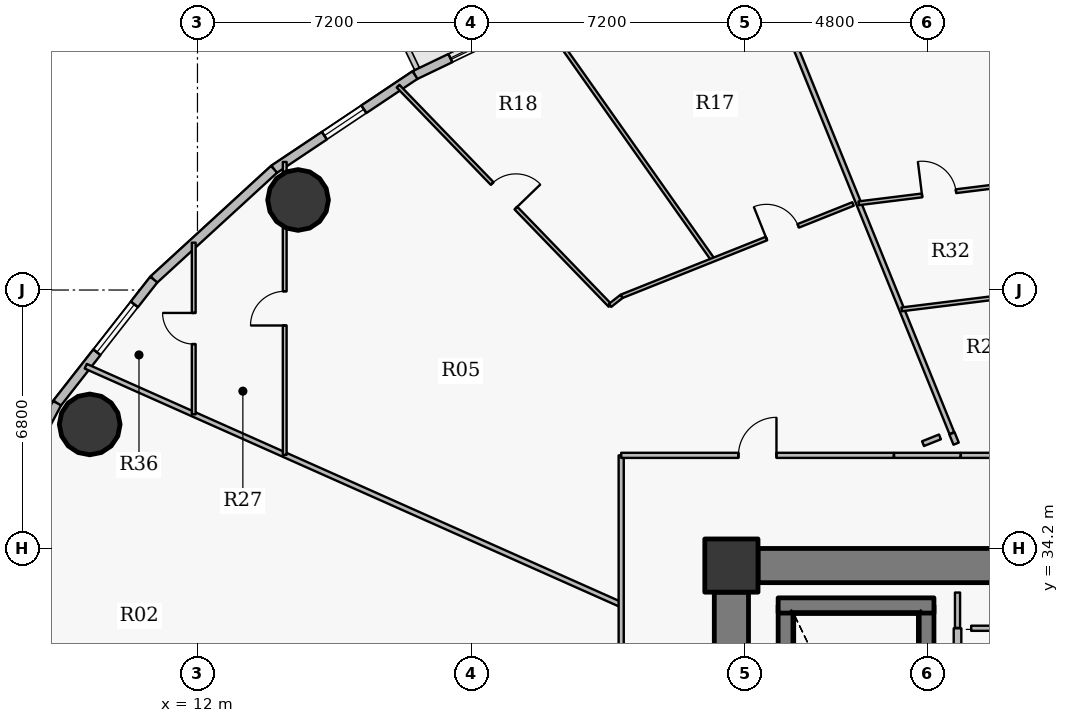
"""IFC4 building model, lengths in metres.
Left out: names, types, materials, properties, quantities, classifications, styles, units other than length and angle.
Written with IfcOpenShell. Run it as: python <this file> out.ifc"""

import sys

from ifc_helpers import new_model, si_unit, direction, frame, frame_2d, origin, origin_2d, place, context, subcontext, project, spatial, rectangle, hollow_circle, extrude, source, transform, mapped, element, fill, save


model = new_model("IFC4")
c1 = context("Model", 3, precision=1e-05, world=origin(), true_north=direction((0.0, 1.0)))
c2 = subcontext(c1, "Body", "Model", "MODEL_VIEW")
j1 = project(units=[si_unit("LENGTHUNIT", "METRE"), si_unit("PLANEANGLEUNIT", "RADIAN")], contexts=[c1])
p1 = place(None, origin())
s1 = spatial("IfcSite", under=j1, at=p1, CompositionType="ELEMENT")
p2 = place(p1, origin())
s2 = spatial("IfcBuilding", under=s1, at=p2, CompositionType="ELEMENT")
p3 = place(p2, frame((0.0, 0.0, 61.8)))
s3 = spatial("IfcBuildingStorey", under=s2, at=p3, CompositionType="ELEMENT", Elevation=61.8)
p4 = place(p3, frame((26.05, 33.75, 0.0), z_axis=(0.0, 0.0, 1.0), x_axis=(1.0, 0.0, 0.0)))
e1 = element("IfcColumn", 1, at=p4, inside=s3, PredefinedType="COLUMN", context=c2, shape_type="SweptSolid", body=[
    extrude(rectangle(XDim=1.4, YDim=1.4, at=origin_2d()), origin(), (0.0, 0.0, 1.0), 4.2),
])
p5 = place(p3, frame((27.48, 24.1, 0.0), z_axis=(0.0, 0.0, 1.0), x_axis=(0.0, 1.0, 0.0)))
e2 = element("IfcWall", 2, at=p5, inside=s3, PredefinedType="SHEAR", context=c2, shape_type="SweptSolid", body=[
    extrude(rectangle(XDim=8.6, YDim=0.4, at=frame_2d((4.3, 0.0))), origin(), (0.0, 0.0, 1.0), 4.2),
])
p6 = place(p3, frame((31.18, 27.8, 0.0), z_axis=(0.0, 0.0, 1.0), x_axis=(0.0, 1.0, 0.0)))
e3 = element("IfcWall", 3, at=p6, inside=s3, PredefinedType="SHEAR", context=c2, shape_type="SweptSolid", body=[
    extrude(rectangle(XDim=4.9, YDim=0.4, at=frame_2d((2.45, 0.0))), origin(), (0.0, 0.0, 1.0), 4.2),
])
p7 = place(p3, frame((27.28, 32.7, 0.0), z_axis=(0.0, 0.0, 1.0), x_axis=(1.0, 0.0, 0.0)))
e4 = element("IfcWall", 4, at=p7, inside=s3, PredefinedType="SHEAR", context=c2, shape_type="SweptSolid", body=[
    extrude(rectangle(XDim=4.1, YDim=0.4, at=frame_2d((2.05, 0.0))), origin(), (0.0, 0.0, 1.0), 4.2),
])
p8 = place(p3, frame((26.75, 33.75, 0.0), z_axis=(0.0, 0.0, 1.0), x_axis=(1.0, 0.0, 0.0)))
e5 = element("IfcWall", 5, at=p8, inside=s3, PredefinedType="SHEAR", context=c2, shape_type="SweptSolid", body=[
    extrude(rectangle(XDim=18.5, YDim=0.9, at=frame_2d((9.25, 0.0))), origin(), (0.0, 0.0, 1.0), 3.4),
])
p9 = place(p3, frame((26.05, 20.95, 0.0), z_axis=(0.0, 0.0, 1.0), x_axis=(0.0, 1.0, 0.0)))
e6 = element("IfcWall", 6, at=p9, inside=s3, PredefinedType="SHEAR", context=c2, shape_type="SweptSolid", body=[
    extrude(rectangle(XDim=12.1, YDim=0.9, at=frame_2d((6.05, 0.0))), origin(), (0.0, 0.0, 1.0), 3.4),
])
p10 = place(p9, frame((5.64, 0.0, 0.0)))
e7 = element("IfcOpeningElement", 7, at=p10, cuts=e6, PredefinedType="OPENING", context=c2, shape_type="SweptSolid", body=[
    extrude(rectangle(XDim=0.82, YDim=2.1, at=origin_2d()), frame((0.41, 0.46, 1.05), z_axis=(0.0, -1.0, 0.0), x_axis=(1.0, 0.0, 0.0)), (0.0, 0.0, 1.0), 0.92),
])
for number, where, z_axis, x_axis in (
    (8, (14.647, 43.369, 0.0), (0.0, 0.0, 1.0), (1.0, 0.0, 0.0)),
    (9, (9.165, 37.464, 0.0), (0.0, 0.0, 1.0), (1.0, 0.0, 0.0)),
):
    element("IfcColumn", number, at=place(p3, frame(where, z_axis=z_axis, x_axis=x_axis)), inside=s3, PredefinedType="COLUMN", context=c2, shape_type="SweptSolid", body=[
        extrude(hollow_circle(Radius=0.8, WallThickness=0.045, at=origin_2d()), origin(), (0.0, 0.0, 1.0), 4.2),
    ])
p11 = place(p3, frame((17.723, 46.656, 0.0), z_axis=(0.0, 0.0, 1.0), x_axis=(0.901601503137, 0.432567601123, 0.0)))
e10 = element("IfcWall", 10, at=p11, inside=s3, PredefinedType="SOLIDWALL", context=c2, shape_type="SweptSolid", body=[
    extrude(rectangle(XDim=4.613, YDim=0.24, at=frame_2d((2.306, 0.0))), origin(), (0.0, 0.0, 1.0), 3.95),
])
p12 = place(p11, frame((1.034, 0.0, 0.9)))
e11 = element("IfcOpeningElement", 11, at=p12, cuts=e10, PredefinedType="OPENING", context=c2, shape_type="SweptSolid", body=[
    extrude(rectangle(XDim=2.0, YDim=1.75, at=origin_2d()), frame((1.0, 0.13, 0.875), z_axis=(0.0, -1.0, 0.0), x_axis=(1.0, 0.0, 0.0)), (0.0, 0.0, 1.0), 0.26),
])
p13 = place(p3, frame((14.015, 44.176, 0.0), z_axis=(0.0, 0.0, 1.0), x_axis=(0.831240982525, 0.555912249343, 0.0)))
e12 = element("IfcWall", 12, at=p13, inside=s3, PredefinedType="SOLIDWALL", context=c2, shape_type="SweptSolid", body=[
    extrude(rectangle(XDim=4.46, YDim=0.24, at=frame_2d((2.23, 0.0))), origin(), (0.0, 0.0, 1.0), 3.95),
])
p14 = place(p13, frame((1.593, 0.0, 0.9)))
e13 = element("IfcOpeningElement", 13, at=p14, cuts=e12, PredefinedType="OPENING", context=c2, shape_type="SweptSolid", body=[
    extrude(rectangle(XDim=1.25, YDim=1.65, at=origin_2d()), frame((0.625, 0.13, 0.825), z_axis=(0.0, -1.0, 0.0), x_axis=(1.0, 0.0, 0.0)), (0.0, 0.0, 1.0), 0.26),
])
p15 = place(p3, frame((10.85, 41.275, 0.0), z_axis=(0.0, 0.0, 1.0), x_axis=(0.737116376281, 0.67576582321, 0.0)))
e14 = element("IfcWall", 14, at=p15, inside=s3, PredefinedType="SOLIDWALL", context=c2, shape_type="SweptSolid", body=[
    extrude(rectangle(XDim=4.294, YDim=0.24, at=frame_2d((2.147, 0.0))), origin(), (0.0, 0.0, 1.0), 3.95),
])
p16 = place(p3, frame((8.305, 38.023, 0.0), z_axis=(0.0, 0.0, 1.0), x_axis=(0.616295508253, 0.787514981767, 0.0)))
e15 = element("IfcWall", 15, at=p16, inside=s3, PredefinedType="SOLIDWALL", context=c2, shape_type="SweptSolid", body=[
    extrude(rectangle(XDim=4.129, YDim=0.24, at=frame_2d((2.065, 0.0))), origin(), (0.0, 0.0, 1.0), 3.95),
])
p17 = place(p16, frame((1.701, 0.0, 0.9)))
e16 = element("IfcOpeningElement", 16, at=p17, cuts=e15, PredefinedType="OPENING", context=c2, shape_type="SweptSolid", body=[
    extrude(rectangle(XDim=1.6, YDim=1.75, at=origin_2d()), frame((0.8, 0.13, 0.875), z_axis=(0.0, -1.0, 0.0), x_axis=(1.0, 0.0, 0.0)), (0.0, 0.0, 1.0), 0.26),
])
p18 = place(p3, frame((6.442, 34.501, 0.0), z_axis=(0.0, 0.0, 1.0), x_axis=(0.467662443071, 0.883907144072, 0.0)))
e17 = element("IfcWall", 17, at=p18, inside=s3, PredefinedType="SOLIDWALL", context=c2, shape_type="SweptSolid", body=[
    extrude(rectangle(XDim=3.984, YDim=0.24, at=frame_2d((1.992, 0.0))), origin(), (0.0, 0.0, 1.0), 3.95),
])
p19 = place(p3, frame((9.06, 38.995, 0.0), z_axis=(0.0, 0.0, 1.0), x_axis=(0.913545036193, -0.406737589666, 0.0)))
e18 = element("IfcWall", 18, at=p19, inside=s3, PredefinedType="PARTITIONING", context=c2, shape_type="SweptSolid", body=[
    extrude(rectangle(XDim=15.424, YDim=0.135, at=frame_2d((7.712, 0.0))), origin(), (0.0, 0.0, 1.0), 3.335),
])
p20 = place(p3, frame((11.902, 37.729, 0.0), z_axis=(0.0, 0.0, 1.0), x_axis=(0.0, 1.0, 0.0)))
e19 = element("IfcWall", 19, at=p20, inside=s3, PredefinedType="PARTITIONING", context=c2, shape_type="SweptSolid", body=[
    extrude(rectangle(XDim=4.516, YDim=0.1, at=frame_2d((2.258, 0.0))), origin(), (0.0, 0.0, 1.0), 3.335),
])
p21 = place(p20, frame((1.848, 0.0, 0.0)))
e20 = element("IfcOpeningElement", 20, at=p21, cuts=e19, PredefinedType="OPENING", context=c2, shape_type="SweptSolid", body=[
    extrude(rectangle(XDim=0.82, YDim=2.1, at=origin_2d()), frame((0.41, 0.06, 1.05), z_axis=(0.0, -1.0, 0.0), x_axis=(1.0, 0.0, 0.0)), (0.0, 0.0, 1.0), 0.12),
])
p22 = place(p3, frame((14.296, 36.663, 0.0), z_axis=(0.0, 0.0, 1.0), x_axis=(0.0, 1.0, 0.0)))
e21 = element("IfcWall", 21, at=p22, inside=s3, PredefinedType="PARTITIONING", context=c2, shape_type="SweptSolid", body=[
    extrude(rectangle(XDim=7.706, YDim=0.1, at=frame_2d((3.853, 0.0))), origin(), (0.0, 0.0, 1.0), 3.335),
])
p23 = place(p22, frame((3.403, 0.0, 0.0)))
e22 = element("IfcOpeningElement", 22, at=p23, cuts=e21, PredefinedType="OPENING", context=c2, shape_type="SweptSolid", body=[
    extrude(rectangle(XDim=0.9, YDim=2.1, at=origin_2d()), frame((0.45, 0.06, 1.05), z_axis=(0.0, -1.0, 0.0), x_axis=(1.0, 0.0, 0.0)), (0.0, 0.0, 1.0), 0.12),
])
p24 = place(p3, frame((17.278, 46.364, 0.0), z_axis=(0.0, 0.0, 1.0), x_axis=(0.695065082159, -0.718946821096, 0.0)))
e23 = element("IfcWall", 23, at=p24, inside=s3, PredefinedType="PARTITIONING", context=c2, shape_type="SweptSolid", body=[
    extrude(rectangle(XDim=8.025, YDim=0.1, at=frame_2d((4.012, 0.0))), origin(), (0.0, 0.0, 1.0), 3.335),
])
p25 = place(p24, frame((3.562, 0.0, 0.0)))
e24 = element("IfcOpeningElement", 24, at=p25, cuts=e23, PredefinedType="OPENING", context=c2, shape_type="SweptSolid", body=[
    extrude(rectangle(XDim=0.9, YDim=2.1, at=origin_2d()), frame((0.45, 0.06, 1.05), z_axis=(0.0, -1.0, 0.0), x_axis=(1.0, 0.0, 0.0)), (0.0, 0.0, 1.0), 0.12),
])
p26 = place(p3, frame((21.018, 48.242, 0.0), z_axis=(0.0, 0.0, 1.0), x_axis=(0.576363688098, -0.817193305799, 0.0)))
e25 = element("IfcWall", 25, at=p26, inside=s3, PredefinedType="PARTITIONING", context=c2, shape_type="SweptSolid", body=[
    extrude(rectangle(XDim=7.891, YDim=0.1, at=frame_2d((3.946, 0.0))), origin(), (0.0, 0.0, 1.0), 3.335),
])
p27 = place(p3, frame((22.856, 40.595, 0.0), z_axis=(0.0, 0.0, 1.0), x_axis=(0.787425680638, 0.616409602027, 0.0)))
e26 = element("IfcWall", 26, at=p27, inside=s3, PredefinedType="PARTITIONING", context=c2, shape_type="SweptSolid", body=[
    extrude(rectangle(XDim=0.39, YDim=0.1, at=frame_2d((0.195, 0.0))), origin(), (0.0, 0.0, 1.0), 3.95),
])
p28 = place(p3, frame((23.15, 26.086, 0.0), z_axis=(0.0, 0.0, 1.0), x_axis=(0.0, 1.0, 0.0)))
e27 = element("IfcWall", 27, at=p28, inside=s3, PredefinedType="PARTITIONING", context=c2, shape_type="SweptSolid", body=[
    extrude(rectangle(XDim=10.564, YDim=0.135, at=frame_2d((5.282, 0.0))), origin(), (0.0, 0.0, 1.0), 3.285),
])
p29 = place(p28, frame((4.403, 0.0, 0.0)))
e28 = element("IfcOpeningElement", 28, at=p29, cuts=e27, PredefinedType="OPENING", context=c2, shape_type="SweptSolid", body=[
    extrude(rectangle(XDim=1.0, YDim=2.15, at=origin_2d()), frame((0.5, 0.078, 1.075), z_axis=(0.0, -1.0, 0.0), x_axis=(1.0, 0.0, 0.0)), (0.0, 0.0, 1.0), 0.155),
])
p30 = place(p3, frame((23.15, 36.65, 0.0), z_axis=(0.0, 0.0, 1.0), x_axis=(1.0, 0.0, 0.0)))
e29 = element("IfcWall", 29, at=p30, inside=s3, PredefinedType="PARTITIONING", context=c2, shape_type="SweptSolid", body=[
    extrude(rectangle(XDim=7.171, YDim=0.135, at=frame_2d((3.586, 0.0))), origin(), (0.0, 0.0, 1.0), 3.285),
])
p31 = place(p30, frame((3.086, 0.0, 0.0)))
e30 = element("IfcOpeningElement", 30, at=p31, cuts=e29, PredefinedType="OPENING", context=c2, shape_type="SweptSolid", body=[
    extrude(rectangle(XDim=1.0, YDim=2.15, at=origin_2d()), frame((0.5, 0.078, 1.075), z_axis=(0.0, -1.0, 0.0), x_axis=(1.0, 0.0, 0.0)), (0.0, 0.0, 1.0), 0.155),
])
p32 = place(p3, frame((23.163, 40.835, 0.0), z_axis=(0.0, 0.0, 1.0), x_axis=(0.928807683782, 0.370562122386, 0.0)))
e31 = element("IfcWall", 31, at=p32, inside=s3, PredefinedType="PARTITIONING", context=c2, shape_type="SweptSolid", body=[
    extrude(rectangle(XDim=6.555, YDim=0.1, at=frame_2d((3.277, 0.0))), origin(), (0.0, 0.0, 1.0), 3.285),
])
p33 = place(p32, frame((4.101, 0.0, 0.0)))
e32 = element("IfcOpeningElement", 32, at=p33, cuts=e31, PredefinedType="OPENING", context=c2, shape_type="SweptSolid", body=[
    extrude(rectangle(XDim=0.9, YDim=2.1, at=origin_2d()), frame((0.45, 0.06, 1.05), z_axis=(0.0, -1.0, 0.0), x_axis=(1.0, 0.0, 0.0)), (0.0, 0.0, 1.0), 0.12),
])
p34 = place(p3, frame((26.611, 50.16, 0.0), z_axis=(0.0, 0.0, 1.0), x_axis=(0.375705515061, -0.926739103498, 0.0)))
e33 = element("IfcWall", 33, at=p34, inside=s3, PredefinedType="PARTITIONING", context=c2, shape_type="SweptSolid", body=[
    extrude(rectangle(XDim=13.947, YDim=0.135, at=frame_2d((6.974, 0.0))), origin(), (0.0, 0.0, 1.0), 3.285),
])
p35 = place(p3, frame((29.399, 43.282, 0.0), z_axis=(0.0, 0.0, 1.0), x_axis=(0.992398165626, 0.123068602261, 0.0)))
e34 = element("IfcWall", 34, at=p35, inside=s3, PredefinedType="PARTITIONING", context=c2, shape_type="SweptSolid", body=[
    extrude(rectangle(XDim=4.261, YDim=0.1, at=frame_2d((2.131, 0.0))), origin(), (0.0, 0.0, 1.0), 3.95),
])
p36 = place(p35, frame((1.681, 0.0, 0.0)))
e35 = element("IfcOpeningElement", 35, at=p36, cuts=e34, PredefinedType="OPENING", context=c2, shape_type="SweptSolid", body=[
    extrude(rectangle(XDim=0.9, YDim=2.1, at=origin_2d()), frame((0.45, 0.06, 1.05), z_axis=(0.0, -1.0, 0.0), x_axis=(1.0, 0.0, 0.0)), (0.0, 0.0, 1.0), 0.12),
])
p37 = place(p3, frame((30.531, 40.491, 0.0), z_axis=(0.0, 0.0, 1.0), x_axis=(0.99240396164, 0.123021855464, 0.0)))
e36 = element("IfcWall", 36, at=p37, inside=s3, PredefinedType="PARTITIONING", context=c2, shape_type="SweptSolid", body=[
    extrude(rectangle(XDim=3.531, YDim=0.1, at=frame_2d((1.765, 0.0))), origin(), (0.0, 0.0, 1.0), 3.95),
])
p38 = place(p3, frame((32.0, 24.1, 0.0), z_axis=(0.0, 0.0, 1.0), x_axis=(0.0, 1.0, 0.0)))
e37 = element("IfcWall", 37, at=p38, inside=s3, PredefinedType="PARTITIONING", context=c2, shape_type="SweptSolid", body=[
    extrude(rectangle(XDim=8.0, YDim=0.2, at=frame_2d((4.0, 0.0))), origin(), (0.0, 0.0, 1.0), 3.95),
])
p39 = place(p3, frame((32.088, 36.65, 0.0), z_axis=(0.0, 0.0, 1.0), x_axis=(1.0, 0.0, 0.0)))
e38 = element("IfcWall", 38, at=p39, inside=s3, PredefinedType="PARTITIONING", context=c2, shape_type="SweptSolid", body=[
    extrude(rectangle(XDim=9.036, YDim=0.135, at=frame_2d((4.518, 0.0))), origin(), (0.0, 0.0, 1.0), 3.285),
])
p40 = place(p39, frame((3.238, 0.0, 0.0)))
e39 = element("IfcOpeningElement", 39, at=p40, cuts=e38, PredefinedType="OPENING", context=c2, shape_type="SweptSolid", body=[
    extrude(rectangle(XDim=1.0, YDim=2.15, at=origin_2d()), frame((0.5, 0.078, 1.075), z_axis=(0.0, -1.0, 0.0), x_axis=(1.0, 0.0, 0.0)), (0.0, 0.0, 1.0), 0.155),
])
p41 = place(p3, frame((32.36, 32.1, 0.0), z_axis=(0.0, 0.0, 1.0), x_axis=(1.0, 0.0, 0.0)))
e40 = element("IfcWall", 40, at=p41, inside=s3, PredefinedType="PARTITIONING", context=c2, shape_type="SweptSolid", body=[
    extrude(rectangle(XDim=1.18, YDim=0.135, at=frame_2d((0.59, 0.0))), origin(), (0.0, 0.0, 1.0), 3.535),
])
p42 = place(p3, frame((32.0, 33.04, 0.0), z_axis=(0.0, 0.0, 1.0), x_axis=(0.0, -1.0, 0.0)))
e41 = element("IfcWall", 41, at=p42, inside=s3, PredefinedType="PARTITIONING", context=c2, shape_type="SweptSolid", body=[
    extrude(rectangle(XDim=0.93, YDim=0.135, at=frame_2d((0.465, 0.0))), origin(), (0.0, 0.0, 1.0), 3.485),
])
p43 = place(p3, frame((30.331, 36.65, 0.0), z_axis=(0.0, 0.0, 1.0), x_axis=(1.0, 0.0, 0.0)))
e42 = element("IfcWall", 42, at=p43, inside=s3, PredefinedType="PARTITIONING", context=c2, shape_type="SweptSolid", body=[
    extrude(rectangle(XDim=1.747, YDim=0.135, at=frame_2d((0.873, 0.0))), origin(), (0.0, 0.0, 1.0), 3.285),
])
p44 = place(p3, frame((26.74, 34.2, 0.0), z_axis=(0.0, 0.0, 1.0), x_axis=(-1.0, 0.0, 0.0)))
e43 = element("IfcWall", 43, at=p44, inside=s3, PredefinedType="PARTITIONING", context=c2, shape_type="SweptSolid", body=[
    extrude(rectangle(XDim=1.14, YDim=0.135, at=frame_2d((0.57, 0.0))), origin(), (0.0, 0.0, 1.0), 3.285),
])
p45 = place(p3, frame((25.6, 33.893, 0.0), z_axis=(0.0, 0.0, 1.0), x_axis=(0.0, -1.0, 0.0)))
e44 = element("IfcWall", 44, at=p45, inside=s3, PredefinedType="PARTITIONING", context=c2, shape_type="SweptSolid", body=[
    extrude(rectangle(XDim=0.833, YDim=0.135, at=frame_2d((0.416, 0.0))), origin(), (0.0, 0.0, 1.0), 3.95),
])
p46 = place(p3, frame((31.963, 36.958, 0.0), z_axis=(0.0, 0.0, 1.0), x_axis=(-0.375901177524, 0.926659756727, 0.0)))
e45 = element("IfcWall", 45, at=p46, inside=s3, PredefinedType="PARTITIONING", context=c2, shape_type="SweptSolid", body=[
    extrude(rectangle(XDim=0.289, YDim=0.15, at=frame_2d((0.145, 0.0))), origin(), (0.0, 0.0, 1.0), 3.285),
])
p47 = place(p3, frame((31.538, 37.135, 0.0), z_axis=(0.0, 0.0, 1.0), x_axis=(-0.928897092386, -0.370337942638, 0.0)))
e46 = element("IfcWall", 46, at=p47, inside=s3, PredefinedType="PARTITIONING", context=c2, shape_type="SweptSolid", body=[
    extrude(rectangle(XDim=0.48, YDim=0.135, at=frame_2d((0.24, 0.0))), origin(), (0.0, 0.0, 1.0), 3.285),
])
m1 = source(origin(), c2, "Body", "SweptSolid", [
    extrude(rectangle(XDim=2.0, YDim=1.75, at=origin_2d()), frame((1.0, 0.03, 0.875), z_axis=(0.0, -1.0, 0.0), x_axis=(1.0, 0.0, 0.0)), (0.0, 0.0, 1.0), 0.06),
])
p48 = place(p12, origin())
e47 = element("IfcWindow", 47, at=p48, inside=s3, PartitioningType="DOUBLE_PANEL_VERTICAL", PredefinedType="WINDOW", context=c2, shape_type="MappedRepresentation", body=[
    mapped(m1, transform((0.0, 0.0, 0.0), x_axis=(1.0, 0.0, 0.0), y_axis=(0.0, 1.0, 0.0), z_axis=(0.0, 0.0, 1.0), scale=1.0)),
])
fill(e11, e47)
m2 = source(origin(), c2, "Body", "SweptSolid", [
    extrude(rectangle(XDim=1.6, YDim=1.75, at=origin_2d()), frame((0.8, 0.03, 0.875), z_axis=(0.0, -1.0, 0.0), x_axis=(1.0, 0.0, 0.0)), (0.0, 0.0, 1.0), 0.06),
])
p49 = place(p17, origin())
e48 = element("IfcWindow", 48, at=p49, inside=s3, PartitioningType="DOUBLE_PANEL_VERTICAL", PredefinedType="WINDOW", context=c2, shape_type="MappedRepresentation", body=[
    mapped(m2, transform((0.0, 0.0, 0.0), x_axis=(1.0, 0.0, 0.0), y_axis=(0.0, 1.0, 0.0), z_axis=(0.0, 0.0, 1.0), scale=1.0)),
])
fill(e16, e48)
m3 = source(origin(), c2, "Body", "SweptSolid", [
    extrude(rectangle(XDim=1.25, YDim=1.65, at=origin_2d()), frame((0.625, 0.03, 0.825), z_axis=(0.0, -1.0, 0.0), x_axis=(1.0, 0.0, 0.0)), (0.0, 0.0, 1.0), 0.06),
])
p50 = place(p14, origin())
e49 = element("IfcWindow", 49, at=p50, inside=s3, PartitioningType="SINGLE_PANEL", PredefinedType="WINDOW", context=c2, shape_type="MappedRepresentation", body=[
    mapped(m3, transform((0.0, 0.0, 0.0), x_axis=(1.0, 0.0, 0.0), y_axis=(0.0, 1.0, 0.0), z_axis=(0.0, 0.0, 1.0), scale=1.0)),
])
fill(e13, e49)
m4 = source(origin(), c2, "Body", "SweptSolid", [
    extrude(rectangle(XDim=0.9, YDim=2.1, at=origin_2d()), frame((0.45, 0.025, 1.05), z_axis=(0.0, -1.0, 0.0), x_axis=(1.0, 0.0, 0.0)), (0.0, 0.0, 1.0), 0.05),
])
p51 = place(p36, origin())
e50 = element("IfcDoor", 50, at=p51, inside=s3, OperationType="SINGLE_SWING_LEFT", PredefinedType="DOOR", context=c2, shape_type="MappedRepresentation", body=[
    mapped(m4, transform((0.0, 0.0, 0.0), x_axis=(1.0, 0.0, 0.0), y_axis=(0.0, 1.0, 0.0), z_axis=(0.0, 0.0, 1.0), scale=1.0)),
])
fill(e35, e50)
m5 = source(origin(), c2, "Body", "SweptSolid", [
    extrude(rectangle(XDim=1.0, YDim=2.15, at=origin_2d()), frame((0.5, 0.025, 1.075), z_axis=(0.0, -1.0, 0.0), x_axis=(1.0, 0.0, 0.0)), (0.0, 0.0, 1.0), 0.05),
])
p52 = place(p31, origin())
e51 = element("IfcDoor", 51, at=p52, inside=s3, OperationType="SINGLE_SWING_RIGHT", PredefinedType="DOOR", context=c2, shape_type="MappedRepresentation", body=[
    mapped(m5, transform((0.0, 0.0, 0.0), x_axis=(1.0, 0.0, 0.0), y_axis=(0.0, 1.0, 0.0), z_axis=(0.0, 0.0, 1.0), scale=1.0)),
])
fill(e30, e51)
p53 = place(p33, origin())
e52 = element("IfcDoor", 52, at=p53, inside=s3, OperationType="SINGLE_SWING_LEFT", PredefinedType="DOOR", context=c2, shape_type="MappedRepresentation", body=[
    mapped(m4, transform((0.0, 0.0, 0.0), x_axis=(1.0, 0.0, 0.0), y_axis=(0.0, 1.0, 0.0), z_axis=(0.0, 0.0, 1.0), scale=1.0)),
])
fill(e32, e52)
p54 = place(p25, origin())
e53 = element("IfcDoor", 53, at=p54, inside=s3, OperationType="SINGLE_SWING_RIGHT", PredefinedType="DOOR", context=c2, shape_type="MappedRepresentation", body=[
    mapped(m4, transform((0.0, 0.0, 0.0), x_axis=(1.0, 0.0, 0.0), y_axis=(0.0, 1.0, 0.0), z_axis=(0.0, 0.0, 1.0), scale=1.0)),
])
fill(e24, e53)
p55 = place(p23, origin())
e54 = element("IfcDoor", 54, at=p55, inside=s3, OperationType="SINGLE_SWING_LEFT", PredefinedType="DOOR", context=c2, shape_type="MappedRepresentation", body=[
    mapped(m4, transform((0.0, 0.0, 0.0), x_axis=(1.0, 0.0, 0.0), y_axis=(0.0, 1.0, 0.0), z_axis=(0.0, 0.0, 1.0), scale=1.0)),
])
fill(e22, e54)
m6 = source(origin(), c2, "Body", "SweptSolid", [
    extrude(rectangle(XDim=0.82, YDim=2.1, at=origin_2d()), frame((0.41, 0.025, 1.05), z_axis=(0.0, -1.0, 0.0), x_axis=(1.0, 0.0, 0.0)), (0.0, 0.0, 1.0), 0.05),
])
p56 = place(p21, origin())
e55 = element("IfcDoor", 55, at=p56, inside=s3, OperationType="SINGLE_SWING_RIGHT", PredefinedType="DOOR", context=c2, shape_type="MappedRepresentation", body=[
    mapped(m6, transform((0.0, 0.0, 0.0), x_axis=(1.0, 0.0, 0.0), y_axis=(0.0, 1.0, 0.0), z_axis=(0.0, 0.0, 1.0), scale=1.0)),
])
fill(e20, e55)
save(model, sys.argv[1])
